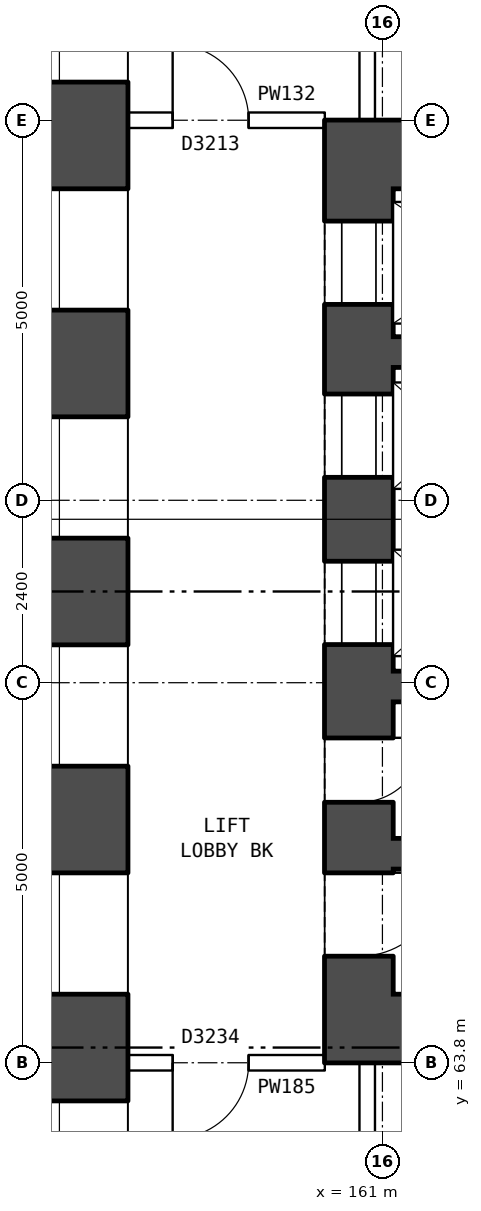
"""IFC4 building model, lengths in metres.
Left out: names, types, materials, properties, quantities, classifications, styles, units other than length and angle.
Written with IfcOpenShell. Run it as: python <this file> out.ifc"""

import sys

from ifc_helpers import new_model, si_unit, direction, frame, frame_2d, origin, place, context, subcontext, project, spatial, rectangle, extrude, element, fill, save


model = new_model("IFC4")
c1 = context("Model", 3, precision=1e-05, world=origin(), true_north=direction((0.0, 1.0)))
c2 = subcontext(c1, "Body", "Model", "MODEL_VIEW")
j1 = project(units=[si_unit("LENGTHUNIT", "METRE"), si_unit("PLANEANGLEUNIT", "RADIAN")], contexts=[c1])
p1 = place(None, origin())
s1 = spatial("IfcSite", under=j1, at=p1, CompositionType="ELEMENT")
p2 = place(p1, origin())
s2 = spatial("IfcBuilding", under=s1, at=p2, CompositionType="ELEMENT")
p3 = place(p2, frame((0.0, 0.0, 10.1)))
s3 = spatial("IfcBuildingStorey", under=s2, at=p3, CompositionType="ELEMENT", Elevation=10.1)
p4 = place(p3, frame((157.05, 56.4, -0.3), z_axis=(0.0, 0.0, 1.0), x_axis=(0.0, 1.0, 0.0)))
e1 = element("IfcWall", 1, at=p4, inside=s3, PredefinedType="SHEAR", context=c2, shape_type="SweptSolid", body=[
    extrude(rectangle(XDim=27.2, YDim=1.2, at=frame_2d((13.6, 0.0))), origin(), (0.0, 0.0, 1.0), 4.4),
])
p5 = place(p4, frame((2.3, 0.0, 0.8)))
e2 = element("IfcOpeningElement", 2, at=p5, cuts=e1, PredefinedType="OPENING", context=c2, shape_type="SweptSolid", body=[
    extrude(rectangle(XDim=1.6, YDim=1.8, at=frame_2d((0.8, 0.9))), frame((0.0, 0.61, 0.0), z_axis=(0.0, -1.0, 0.0), x_axis=(1.0, 0.0, 0.0)), (0.0, 0.0, 1.0), 1.22),
])
p6 = place(p4, frame((5.3, 0.0, 0.8)))
e3 = element("IfcOpeningElement", 3, at=p6, cuts=e1, PredefinedType="OPENING", context=c2, shape_type="SweptSolid", body=[
    extrude(rectangle(XDim=1.6, YDim=1.8, at=frame_2d((0.8, 0.9))), frame((0.0, 0.61, 0.0), z_axis=(0.0, -1.0, 0.0), x_axis=(1.0, 0.0, 0.0)), (0.0, 0.0, 1.0), 1.22),
])
p7 = place(p4, frame((8.3, 0.0, 0.8)))
e4 = element("IfcOpeningElement", 4, at=p7, cuts=e1, PredefinedType="OPENING", context=c2, shape_type="SweptSolid", body=[
    extrude(rectangle(XDim=1.6, YDim=1.8, at=frame_2d((0.8, 0.9))), frame((0.0, 0.61, 0.0), z_axis=(0.0, -1.0, 0.0), x_axis=(1.0, 0.0, 0.0)), (0.0, 0.0, 1.0), 1.22),
])
p8 = place(p4, frame((11.3, 0.0, 0.8)))
e5 = element("IfcOpeningElement", 5, at=p8, cuts=e1, PredefinedType="OPENING", context=c2, shape_type="SweptSolid", body=[
    extrude(rectangle(XDim=1.6, YDim=1.8, at=frame_2d((0.8, 0.9))), frame((0.0, 0.61, 0.0), z_axis=(0.0, -1.0, 0.0), x_axis=(1.0, 0.0, 0.0)), (0.0, 0.0, 1.0), 1.22),
])
p9 = place(p4, frame((14.3, 0.0, 0.8)))
e6 = element("IfcOpeningElement", 6, at=p9, cuts=e1, PredefinedType="OPENING", context=c2, shape_type="SweptSolid", body=[
    extrude(rectangle(XDim=1.6, YDim=1.8, at=frame_2d((0.8, 0.9))), frame((0.0, 0.61, 0.0), z_axis=(0.0, -1.0, 0.0), x_axis=(1.0, 0.0, 0.0)), (0.0, 0.0, 1.0), 1.22),
])
p10 = place(p4, frame((17.3, 0.0, 0.8)))
e7 = element("IfcOpeningElement", 7, at=p10, cuts=e1, PredefinedType="OPENING", context=c2, shape_type="SweptSolid", body=[
    extrude(rectangle(XDim=1.6, YDim=1.8, at=frame_2d((0.8, 0.9))), frame((0.0, 0.61, 0.0), z_axis=(0.0, -1.0, 0.0), x_axis=(1.0, 0.0, 0.0)), (0.0, 0.0, 1.0), 1.22),
])
p11 = place(p4, frame((20.3, 0.0, 0.8)))
e8 = element("IfcOpeningElement", 8, at=p11, cuts=e1, PredefinedType="OPENING", context=c2, shape_type="SweptSolid", body=[
    extrude(rectangle(XDim=1.6, YDim=1.8, at=frame_2d((0.8, 0.9))), frame((0.0, 0.61, 0.0), z_axis=(0.0, -1.0, 0.0), x_axis=(1.0, 0.0, 0.0)), (0.0, 0.0, 1.0), 1.22),
])
p12 = place(p4, frame((23.3, 0.0, 0.8)))
e9 = element("IfcOpeningElement", 9, at=p12, cuts=e1, PredefinedType="OPENING", context=c2, shape_type="SweptSolid", body=[
    extrude(rectangle(XDim=1.6, YDim=1.8, at=frame_2d((0.8, 0.9))), frame((0.0, 0.61, 0.0), z_axis=(0.0, -1.0, 0.0), x_axis=(1.0, 0.0, 0.0)), (0.0, 0.0, 1.0), 1.22),
])
p13 = place(p3, frame((160.69, 75.3, 0.0), z_axis=(0.0, 0.0, 1.0), x_axis=(0.0, -1.0, 0.0)))
e10 = element("IfcWall", 10, at=p13, inside=s3, PredefinedType="SHEAR", context=c2, shape_type="SweptSolid", body=[
    extrude(rectangle(XDim=10.6, YDim=0.9, at=frame_2d((5.3, 0.0))), origin(), (0.0, 0.0, 1.0), 4.3),
])
p14 = place(p13, frame((0.425, 0.0, 0.0)))
e11 = element("IfcOpeningElement", 11, at=p14, cuts=e10, PredefinedType="OPENING", context=c2, shape_type="SweptSolid", body=[
    extrude(rectangle(XDim=1.1, YDim=2.1, at=frame_2d((0.55, 1.05))), frame((0.0, 0.46, 0.0), z_axis=(0.0, -1.0, 0.0), x_axis=(1.0, 0.0, 0.0)), (0.0, 0.0, 1.0), 0.92),
])
p15 = place(p13, frame((2.7, 0.0, 0.0)))
e12 = element("IfcOpeningElement", 12, at=p15, cuts=e10, PredefinedType="OPENING", context=c2, shape_type="SweptSolid", body=[
    extrude(rectangle(XDim=1.1, YDim=2.1, at=frame_2d((0.55, 1.05))), frame((0.0, 0.46, 0.0), z_axis=(0.0, -1.0, 0.0), x_axis=(1.0, 0.0, 0.0)), (0.0, 0.0, 1.0), 0.92),
])
p16 = place(p13, frame((4.9, 0.0, 0.0)))
e13 = element("IfcOpeningElement", 13, at=p16, cuts=e10, PredefinedType="OPENING", context=c2, shape_type="SweptSolid", body=[
    extrude(rectangle(XDim=1.1, YDim=2.1, at=frame_2d((0.55, 1.05))), frame((0.0, 0.46, 0.0), z_axis=(0.0, -1.0, 0.0), x_axis=(1.0, 0.0, 0.0)), (0.0, 0.0, 1.0), 0.92),
])
p17 = place(p13, frame((9.0, 0.0, 0.0)))
e14 = element("IfcOpeningElement", 14, at=p17, cuts=e10, PredefinedType="OPENING", context=c2, shape_type="SweptSolid", body=[
    extrude(rectangle(XDim=1.1, YDim=2.1, at=frame_2d((0.55, 1.05))), frame((0.0, 0.46, 0.0), z_axis=(0.0, -1.0, 0.0), x_axis=(1.0, 0.0, 0.0)), (0.0, 0.0, 1.0), 0.92),
])
p18 = place(p13, frame((7.225, 0.0, 0.0)))
e15 = element("IfcOpeningElement", 15, at=p18, cuts=e10, PredefinedType="OPENING", context=c2, shape_type="SweptSolid", body=[
    extrude(rectangle(XDim=0.85, YDim=2.1, at=frame_2d((0.425, 1.05))), frame((0.0, 0.46, 0.0), z_axis=(0.0, -1.0, 0.0), x_axis=(1.0, 0.0, 0.0)), (0.0, 0.0, 1.0), 0.92),
])
for number, where, z_axis, x_axis in (
    (16, (160.24, 75.75, 0.0), (0.0, 0.0, 1.0), (1.0, 0.0, 0.0)),
    (17, (160.24, 64.25, 0.0), (0.0, 0.0, 1.0), (1.0, 0.0, 0.0)),
):
    element("IfcWall", number, at=place(p3, frame(where, z_axis=z_axis, x_axis=x_axis)), inside=s3, PredefinedType="SHEAR", context=c2, shape_type="SweptSolid", body=[
        extrude(rectangle(XDim=8.4, YDim=0.9, at=frame_2d((4.2, 0.0))), origin(), (0.0, 0.0, 1.0), 4.3),
    ])
p19 = place(p3, frame((161.14, 73.15, 0.0), z_axis=(0.0, 0.0, 1.0), x_axis=(1.0, 0.0, 0.0)))
e18 = element("IfcWall", 18, at=p19, inside=s3, PredefinedType="SHEAR", context=c2, shape_type="SweptSolid", body=[
    extrude(rectangle(XDim=3.7, YDim=0.4, at=frame_2d((1.85, 0.0))), origin(), (0.0, 0.0, 1.0), 4.3),
])
p20 = place(p3, frame((161.14, 68.75, 0.0), z_axis=(0.0, 0.0, 1.0), x_axis=(1.0, 0.0, 0.0)))
e19 = element("IfcWall", 19, at=p20, inside=s3, PredefinedType="SHEAR", context=c2, shape_type="SweptSolid", body=[
    extrude(rectangle(XDim=6.6, YDim=0.4, at=frame_2d((3.3, 0.0))), origin(), (0.0, 0.0, 1.0), 4.3),
])
p21 = place(p20, frame((4.25, 0.0, 0.0)))
e20 = element("IfcOpeningElement", 20, at=p21, cuts=e19, PredefinedType="OPENING", context=c2, shape_type="SweptSolid", body=[
    extrude(rectangle(XDim=1.1, YDim=2.1, at=frame_2d((0.55, 1.05))), frame((0.0, 0.21, 0.0), z_axis=(0.0, -1.0, 0.0), x_axis=(1.0, 0.0, 0.0)), (0.0, 0.0, 1.0), 0.42),
])
p22 = place(p20, frame((2.6, 0.0, 0.0)))
e21 = element("IfcOpeningElement", 21, at=p22, cuts=e19, PredefinedType="OPENING", context=c2, shape_type="SweptSolid", body=[
    extrude(rectangle(XDim=0.85, YDim=2.1, at=frame_2d((0.425, 1.05))), frame((0.0, 0.21, 0.0), z_axis=(0.0, -1.0, 0.0), x_axis=(1.0, 0.0, 0.0)), (0.0, 0.0, 1.0), 0.42),
])
p23 = place(p3, frame((161.14, 66.55, 0.0), z_axis=(0.0, 0.0, 1.0), x_axis=(1.0, 0.0, 0.0)))
e22 = element("IfcWall", 22, at=p23, inside=s3, PredefinedType="SHEAR", context=c2, shape_type="SweptSolid", body=[
    extrude(rectangle(XDim=1.95, YDim=0.4, at=frame_2d((0.975, 0.0))), origin(), (0.0, 0.0, 1.0), 4.3),
])
p24 = place(p3, frame((157.65, 63.8, 0.0), z_axis=(0.0, 0.0, 1.0), x_axis=(1.0, 0.0, 0.0)))
e23 = element("IfcWall", 23, at=p24, inside=s3, PredefinedType="PARTITIONING", context=c2, shape_type="SweptSolid", body=[
    extrude(rectangle(XDim=2.59, YDim=0.2, at=frame_2d((1.295, 0.0))), origin(), (0.0, 0.0, 1.0), 4.3),
])
p25 = place(p24, frame((0.59, 0.0, 0.0)))
e24 = element("IfcOpeningElement", 24, at=p25, cuts=e23, PredefinedType="OPENING", context=c2, shape_type="SweptSolid", body=[
    extrude(rectangle(XDim=1.0, YDim=2.1, at=frame_2d((0.5, 1.05))), frame((0.0, 0.11, 0.0), z_axis=(0.0, -1.0, 0.0), x_axis=(1.0, 0.0, 0.0)), (0.0, 0.0, 1.0), 0.22),
])
p26 = place(p3, frame((157.65, 76.2, 0.0), z_axis=(0.0, 0.0, 1.0), x_axis=(1.0, 0.0, 0.0)))
e25 = element("IfcWall", 25, at=p26, inside=s3, PredefinedType="PARTITIONING", context=c2, shape_type="SweptSolid", body=[
    extrude(rectangle(XDim=2.59, YDim=0.2, at=frame_2d((1.295, 0.0))), origin(), (0.0, 0.0, 1.0), 4.3),
])
p27 = place(p26, frame((0.59, 0.0, 0.0)))
e26 = element("IfcOpeningElement", 26, at=p27, cuts=e25, PredefinedType="OPENING", context=c2, shape_type="SweptSolid", body=[
    extrude(rectangle(XDim=1.0, YDim=2.1, at=frame_2d((0.5, 1.05))), frame((0.0, 0.11, 0.0), z_axis=(0.0, -1.0, 0.0), x_axis=(1.0, 0.0, 0.0)), (0.0, 0.0, 1.0), 0.22),
])
for number, where, z_axis, x_axis in (
    (27, (160.8, 60.7, 0.0), (0.0, 0.0, 1.0), (0.0, 1.0, 0.0)),
    (28, (160.8, 76.2, 0.0), (0.0, 0.0, 1.0), (0.0, 1.0, 0.0)),
):
    element("IfcWall", number, at=place(p3, frame(where, z_axis=z_axis, x_axis=x_axis)), inside=s3, PredefinedType="PARTITIONING", context=c2, shape_type="SweptSolid", body=[
        extrude(rectangle(XDim=3.1, YDim=0.2, at=frame_2d((1.55, 0.0))), origin(), (0.0, 0.0, 1.0), 4.3),
    ])
p28 = place(p6, origin())
e29 = element("IfcWindow", 29, at=p28, inside=s3, PartitioningType="SINGLE_PANEL", PredefinedType="WINDOW", context=c2, shape_type="SweptSolid", body=[
    extrude(rectangle(XDim=1.6, YDim=1.8, at=frame_2d((0.8, 0.9))), frame((0.0, 0.33, 0.0), z_axis=(0.0, -1.0, 0.0), x_axis=(1.0, 0.0, 0.0)), (0.0, 0.0, 1.0), 0.06),
])
fill(e3, e29)
p29 = place(p7, origin())
e30 = element("IfcWindow", 30, at=p29, inside=s3, PartitioningType="SINGLE_PANEL", PredefinedType="WINDOW", context=c2, shape_type="SweptSolid", body=[
    extrude(rectangle(XDim=1.6, YDim=1.8, at=frame_2d((0.8, 0.9))), frame((0.0, 0.33, 0.0), z_axis=(0.0, -1.0, 0.0), x_axis=(1.0, 0.0, 0.0)), (0.0, 0.0, 1.0), 0.06),
])
fill(e4, e30)
p30 = place(p8, origin())
e31 = element("IfcWindow", 31, at=p30, inside=s3, PartitioningType="SINGLE_PANEL", PredefinedType="WINDOW", context=c2, shape_type="SweptSolid", body=[
    extrude(rectangle(XDim=1.6, YDim=1.8, at=frame_2d((0.8, 0.9))), frame((0.0, 0.33, 0.0), z_axis=(0.0, -1.0, 0.0), x_axis=(1.0, 0.0, 0.0)), (0.0, 0.0, 1.0), 0.06),
])
fill(e5, e31)
p31 = place(p9, origin())
e32 = element("IfcWindow", 32, at=p31, inside=s3, PartitioningType="SINGLE_PANEL", PredefinedType="WINDOW", context=c2, shape_type="SweptSolid", body=[
    extrude(rectangle(XDim=1.6, YDim=1.8, at=frame_2d((0.8, 0.9))), frame((0.0, 0.33, 0.0), z_axis=(0.0, -1.0, 0.0), x_axis=(1.0, 0.0, 0.0)), (0.0, 0.0, 1.0), 0.06),
])
fill(e6, e32)
p32 = place(p10, origin())
e33 = element("IfcWindow", 33, at=p32, inside=s3, PartitioningType="SINGLE_PANEL", PredefinedType="WINDOW", context=c2, shape_type="SweptSolid", body=[
    extrude(rectangle(XDim=1.6, YDim=1.8, at=frame_2d((0.8, 0.9))), frame((0.0, 0.33, 0.0), z_axis=(0.0, -1.0, 0.0), x_axis=(1.0, 0.0, 0.0)), (0.0, 0.0, 1.0), 0.06),
])
fill(e7, e33)
p33 = place(p11, origin())
e34 = element("IfcWindow", 34, at=p33, inside=s3, PartitioningType="SINGLE_PANEL", PredefinedType="WINDOW", context=c2, shape_type="SweptSolid", body=[
    extrude(rectangle(XDim=1.6, YDim=1.8, at=frame_2d((0.8, 0.9))), frame((0.0, 0.33, 0.0), z_axis=(0.0, -1.0, 0.0), x_axis=(1.0, 0.0, 0.0)), (0.0, 0.0, 1.0), 0.06),
])
fill(e8, e34)
p34 = place(p14, origin())
e35 = element("IfcDoor", 35, at=p34, inside=s3, OperationType="DOUBLE_DOOR_SLIDING", PredefinedType="DOOR", context=c2, shape_type="SweptSolid", body=[
    extrude(rectangle(XDim=1.1, YDim=2.1, at=frame_2d((0.55, 1.05))), frame((0.0, 0.435, 0.0), z_axis=(0.0, -1.0, 0.0), x_axis=(1.0, 0.0, 0.0)), (0.0, 0.0, 1.0), 0.05),
])
fill(e11, e35)
p35 = place(p15, origin())
e36 = element("IfcDoor", 36, at=p35, inside=s3, OperationType="DOUBLE_DOOR_SLIDING", PredefinedType="DOOR", context=c2, shape_type="SweptSolid", body=[
    extrude(rectangle(XDim=1.1, YDim=2.1, at=frame_2d((0.55, 1.05))), frame((0.0, 0.435, 0.0), z_axis=(0.0, -1.0, 0.0), x_axis=(1.0, 0.0, 0.0)), (0.0, 0.0, 1.0), 0.05),
])
fill(e12, e36)
p36 = place(p16, origin())
e37 = element("IfcDoor", 37, at=p36, inside=s3, OperationType="DOUBLE_DOOR_SLIDING", PredefinedType="DOOR", context=c2, shape_type="SweptSolid", body=[
    extrude(rectangle(XDim=1.1, YDim=2.1, at=frame_2d((0.55, 1.05))), frame((0.0, 0.435, 0.0), z_axis=(0.0, -1.0, 0.0), x_axis=(1.0, 0.0, 0.0)), (0.0, 0.0, 1.0), 0.05),
])
fill(e13, e37)
p37 = place(p17, origin())
e38 = element("IfcDoor", 38, at=p37, inside=s3, OperationType="SINGLE_SWING_LEFT", PredefinedType="DOOR", context=c2, shape_type="SweptSolid", body=[
    extrude(rectangle(XDim=1.1, YDim=2.1, at=frame_2d((0.55, 1.05))), frame((0.0, 0.435, 0.0), z_axis=(0.0, -1.0, 0.0), x_axis=(1.0, 0.0, 0.0)), (0.0, 0.0, 1.0), 0.05),
])
fill(e14, e38)
p38 = place(p18, origin())
e39 = element("IfcDoor", 39, at=p38, inside=s3, OperationType="SINGLE_SWING_LEFT", PredefinedType="DOOR", context=c2, shape_type="SweptSolid", body=[
    extrude(rectangle(XDim=0.85, YDim=2.1, at=frame_2d((0.425, 1.05))), frame((0.0, 0.435, 0.0), z_axis=(0.0, -1.0, 0.0), x_axis=(1.0, 0.0, 0.0)), (0.0, 0.0, 1.0), 0.05),
])
fill(e15, e39)
p39 = place(p25, frame((1.0, 0.0, 0.0), z_axis=(0.0, 0.0, 1.0), x_axis=(-1.0, 0.0, 0.0)))
e40 = element("IfcDoor", 40, at=p39, inside=s3, OperationType="SINGLE_SWING_RIGHT", PredefinedType="DOOR", context=c2, shape_type="SweptSolid", body=[
    extrude(rectangle(XDim=1.0, YDim=2.1, at=frame_2d((0.5, 1.05))), frame((0.0, 0.025, 0.0), z_axis=(0.0, -1.0, 0.0), x_axis=(1.0, 0.0, 0.0)), (0.0, 0.0, 1.0), 0.05),
])
fill(e24, e40)
p40 = place(p27, origin())
e41 = element("IfcDoor", 41, at=p40, inside=s3, OperationType="SINGLE_SWING_LEFT", PredefinedType="DOOR", context=c2, shape_type="SweptSolid", body=[
    extrude(rectangle(XDim=1.0, YDim=2.1, at=frame_2d((0.5, 1.05))), frame((0.0, 0.025, 0.0), z_axis=(0.0, -1.0, 0.0), x_axis=(1.0, 0.0, 0.0)), (0.0, 0.0, 1.0), 0.05),
])
fill(e26, e41)
save(model, sys.argv[1])
